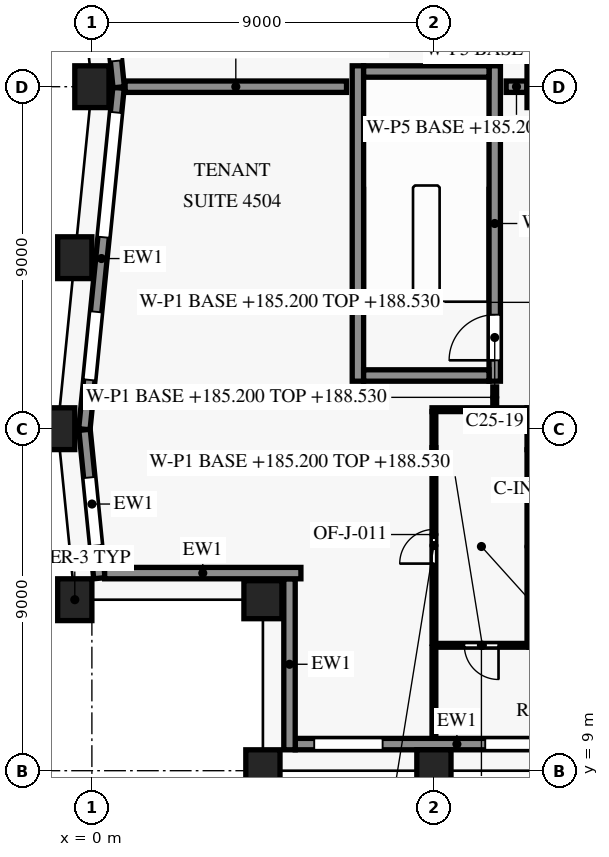
"""IFC4 building model, lengths in metres.
Left out: names, types, materials, properties, quantities, classifications, styles, units other than length and angle.
Written with IfcOpenShell. Run it as: python <this file> out.ifc"""

import sys

from ifc_helpers import new_model, si_unit, direction, frame, frame_2d, origin, origin_2d, place, context, subcontext, project, spatial, rectangle, extrude, element, fill, save


model = new_model("IFC4")
c1 = context("Model", 3, precision=1e-05, world=origin(), true_north=direction((0.0, 1.0)))
c2 = subcontext(c1, "Body", "Model", "MODEL_VIEW")
j1 = project(units=[si_unit("LENGTHUNIT", "METRE"), si_unit("PLANEANGLEUNIT", "RADIAN")], contexts=[c1])
p1 = place(None, origin())
s1 = spatial("IfcSite", under=j1, at=p1, CompositionType="ELEMENT")
p2 = place(p1, origin())
s2 = spatial("IfcBuilding", under=s1, at=p2, CompositionType="ELEMENT")
p3 = place(p2, frame((0.0, 0.0, 185.2)))
s3 = spatial("IfcBuildingStorey", under=s2, at=p3, CompositionType="ELEMENT", Elevation=185.2)
for number, where, z_axis, x_axis in (
    (1, (4.5, 9.0, 0.0), (0.0, 0.0, 1.0), (1.0, 0.0, 0.0)),
    (2, (9.0, 9.0, 0.0), (0.0, 0.0, 1.0), (1.0, 0.0, 0.0)),
    (3, (0.0, 27.0, 0.0), (0.0, 0.0, 1.0), (0.0, -1.0, 0.0)),
    (4, (-0.45, 22.5, 0.0), (0.0, 0.0, 1.0), (-0.1, -0.995, 0.0)),
    (5, (-0.9, 18.0, 0.0), (0.0, 0.0, 1.0), (0.0, -1.0, 0.0)),
    (6, (-0.45, 13.5, 0.0), (0.0, 0.0, 1.0), (0.1, -0.995, 0.0)),
):
    element("IfcColumn", number, at=place(p3, frame(where, z_axis=z_axis, x_axis=x_axis)), inside=s3, PredefinedType="COLUMN", context=c2, shape_type="SweptSolid", body=[
        extrude(rectangle(XDim=0.9, YDim=1.1, at=origin_2d()), origin(), (0.0, 0.0, 1.0), 3.8),
    ])
p4 = place(p3, frame((4.5, 13.5, 0.0), z_axis=(0.0, 0.0, 1.0), x_axis=(1.0, 0.0, 0.0)))
e7 = element("IfcColumn", 7, at=p4, inside=s3, PredefinedType="COLUMN", context=c2, shape_type="SweptSolid", body=[
    extrude(rectangle(XDim=1.0, YDim=1.0, at=origin_2d()), origin(), (0.0, 0.0, 1.0), 3.8),
])
for number, where, z_axis, x_axis in (
    (8, (12.0, 18.0, 0.0), (0.0, 0.0, 1.0), (1.0, 0.0, 0.0)),
    (9, (12.0, 27.0, 0.0), (0.0, 0.0, 1.0), (1.0, 0.0, 0.0)),
):
    element("IfcColumn", number, at=place(p3, frame(where, z_axis=z_axis, x_axis=x_axis)), inside=s3, PredefinedType="COLUMN", context=c2, shape_type="SweptSolid", body=[
        extrude(rectangle(XDim=1.1, YDim=1.1, at=origin_2d()), origin(), (0.0, 0.0, 1.0), 3.8),
    ])
p5 = place(p3, frame((13.86, 9.7, 0.0), z_axis=(0.0, 0.0, 1.0), x_axis=(-1.0, 0.0, 0.0)))
e10 = element("IfcWall", 10, at=p5, inside=s3, PredefinedType="SOLIDWALL", context=c2, shape_type="SweptSolid", body=[
    extrude(rectangle(XDim=8.51, YDim=0.3, at=frame_2d((4.255, 0.0))), origin(), (0.0, 0.0, 1.0), 3.15),
])
p6 = place(p5, frame((1.71, 0.0, 0.75)))
e11 = element("IfcOpeningElement", 11, at=p6, cuts=e10, PredefinedType="OPENING", context=c2, shape_type="SweptSolid", body=[
    extrude(rectangle(XDim=1.8, YDim=1.8, at=frame_2d((0.9, 0.9))), frame((0.0, 0.16, 0.0), z_axis=(0.0, -1.0, 0.0), x_axis=(1.0, 0.0, 0.0)), (0.0, 0.0, 1.0), 0.32),
])
p7 = place(p5, frame((6.21, 0.0, 0.75)))
e12 = element("IfcOpeningElement", 12, at=p7, cuts=e10, PredefinedType="OPENING", context=c2, shape_type="SweptSolid", body=[
    extrude(rectangle(XDim=1.8, YDim=1.8, at=frame_2d((0.9, 0.9))), frame((0.0, 0.16, 0.0), z_axis=(0.0, -1.0, 0.0), x_axis=(1.0, 0.0, 0.0)), (0.0, 0.0, 1.0), 0.32),
])
p8 = place(p3, frame((0.705, 26.985, 0.0), z_axis=(0.0, 0.0, 1.0), x_axis=(-0.099533329093, 0.995034228758, 0.0)))
e13 = element("IfcWall", 13, at=p8, inside=s3, PredefinedType="SOLIDWALL", context=c2, shape_type="SweptSolid", body=[
    extrude(rectangle(XDim=8.98, YDim=0.3, at=frame_2d((4.49, 0.0))), origin(), (0.0, 0.0, 1.0), 3.15),
])
p9 = place(p8, frame((0.696, 0.0, 0.15)))
e14 = element("IfcOpeningElement", 14, at=p9, cuts=e13, PredefinedType="OPENING", context=c2, shape_type="SweptSolid", body=[
    extrude(rectangle(XDim=3.3, YDim=2.4, at=frame_2d((1.65, 1.2))), frame((0.0, 0.16, 0.0), z_axis=(0.0, -1.0, 0.0), x_axis=(1.0, 0.0, 0.0)), (0.0, 0.0, 1.0), 0.32),
])
p10 = place(p8, frame((5.969, 0.0, 0.75)))
e15 = element("IfcOpeningElement", 15, at=p10, cuts=e13, PredefinedType="OPENING", context=c2, shape_type="SweptSolid", body=[
    extrude(rectangle(XDim=1.8, YDim=1.8, at=frame_2d((0.9, 0.9))), frame((0.0, 0.16, 0.0), z_axis=(0.0, -1.0, 0.0), x_axis=(1.0, 0.0, 0.0)), (0.0, 0.0, 1.0), 0.32),
])
p11 = place(p3, frame((-0.198, 17.985, 0.0), z_axis=(0.0, 0.0, 1.0), x_axis=(0.099495688264, 0.995037993253, 0.0)))
e16 = element("IfcWall", 16, at=p11, inside=s3, PredefinedType="SOLIDWALL", context=c2, shape_type="SweptSolid", body=[
    extrude(rectangle(XDim=9.03, YDim=0.3, at=frame_2d((4.515, 0.0))), origin(), (0.0, 0.0, 1.0), 3.15),
])
p12 = place(p11, frame((1.306, 0.0, 0.75)))
e17 = element("IfcOpeningElement", 17, at=p12, cuts=e16, PredefinedType="OPENING", context=c2, shape_type="SweptSolid", body=[
    extrude(rectangle(XDim=1.8, YDim=1.8, at=frame_2d((0.9, 0.9))), frame((0.0, 0.16, 0.0), z_axis=(0.0, -1.0, 0.0), x_axis=(1.0, 0.0, 0.0)), (0.0, 0.0, 1.0), 0.32),
])
p13 = place(p11, frame((5.079, 0.0, 0.15)))
e18 = element("IfcOpeningElement", 18, at=p13, cuts=e16, PredefinedType="OPENING", context=c2, shape_type="SweptSolid", body=[
    extrude(rectangle(XDim=3.3, YDim=2.4, at=frame_2d((1.65, 1.2))), frame((0.0, 0.16, 0.0), z_axis=(0.0, -1.0, 0.0), x_axis=(1.0, 0.0, 0.0)), (0.0, 0.0, 1.0), 0.32),
])
p14 = place(p3, frame((0.197, 14.065, 0.0), z_axis=(0.0, 0.0, 1.0), x_axis=(-0.099528354722, 0.995034726332, 0.0)))
e19 = element("IfcWall", 19, at=p14, inside=s3, PredefinedType="SOLIDWALL", context=c2, shape_type="SweptSolid", body=[
    extrude(rectangle(XDim=3.925, YDim=0.3, at=frame_2d((1.962, 0.0))), origin(), (0.0, 0.0, 1.0), 3.15),
])
p15 = place(p14, frame((0.864, 0.0, 0.75)))
e20 = element("IfcOpeningElement", 20, at=p15, cuts=e19, PredefinedType="OPENING", context=c2, shape_type="SweptSolid", body=[
    extrude(rectangle(XDim=1.8, YDim=1.8, at=frame_2d((0.9, 0.9))), frame((0.0, 0.16, 0.0), z_axis=(0.0, -1.0, 0.0), x_axis=(1.0, 0.0, 0.0)), (0.0, 0.0, 1.0), 0.32),
])
p16 = place(p3, frame((5.5, 14.2, 0.0), z_axis=(0.0, 0.0, 1.0), x_axis=(-1.0, 0.0, 0.0)))
e21 = element("IfcWall", 21, at=p16, inside=s3, PredefinedType="SOLIDWALL", context=c2, shape_type="SweptSolid", body=[
    extrude(rectangle(XDim=5.165, YDim=0.3, at=frame_2d((2.582, 0.0))), origin(), (0.0, 0.0, 1.0), 3.15),
])
p17 = place(p3, frame((5.2, 9.55, 0.0), z_axis=(0.0, 0.0, 1.0), x_axis=(0.0, 1.0, 0.0)))
e22 = element("IfcWall", 22, at=p17, inside=s3, PredefinedType="SOLIDWALL", context=c2, shape_type="SweptSolid", body=[
    extrude(rectangle(XDim=4.502, YDim=0.3, at=frame_2d((2.251, 0.0))), origin(), (0.0, 0.0, 1.0), 3.15),
])
for number, where, z_axis, x_axis in (
    (23, (7.15, 19.4, 0.0), (0.0, 0.0, 1.0), (1.0, 0.0, 0.0)),
    (24, (7.15, 27.4, 0.0), (0.0, 0.0, 1.0), (1.0, 0.0, 0.0)),
):
    element("IfcWall", number, at=place(p3, frame(where, z_axis=z_axis, x_axis=x_axis)), inside=s3, PredefinedType="SHEAR", context=c2, shape_type="SweptSolid", body=[
        extrude(rectangle(XDim=3.3, YDim=0.3, at=frame_2d((1.65, 0.0))), origin(), (0.0, 0.0, 1.0), 3.5),
    ])
p18 = place(p3, frame((7.0, 19.25, 0.0), z_axis=(0.0, 0.0, 1.0), x_axis=(0.0, 1.0, 0.0)))
e25 = element("IfcWall", 25, at=p18, inside=s3, PredefinedType="SHEAR", context=c2, shape_type="SweptSolid", body=[
    extrude(rectangle(XDim=8.3, YDim=0.3, at=frame_2d((4.15, 0.0))), origin(), (0.0, 0.0, 1.0), 3.5),
])
p19 = place(p3, frame((10.6, 19.25, 0.0), z_axis=(0.0, 0.0, 1.0), x_axis=(0.0, 1.0, 0.0)))
e26 = element("IfcWall", 26, at=p19, inside=s3, PredefinedType="SHEAR", context=c2, shape_type="SweptSolid", body=[
    extrude(rectangle(XDim=8.3, YDim=0.3, at=frame_2d((4.15, 0.0))), origin(), (0.0, 0.0, 1.0), 3.5),
])
p20 = place(p19, frame((0.55, 0.0, 0.0)))
e27 = element("IfcOpeningElement", 27, at=p20, cuts=e26, PredefinedType="OPENING", context=c2, shape_type="SweptSolid", body=[
    extrude(rectangle(XDim=1.2, YDim=2.2, at=frame_2d((0.6, 1.1))), frame((0.0, 0.16, 0.0), z_axis=(0.0, -1.0, 0.0), x_axis=(1.0, 0.0, 0.0)), (0.0, 0.0, 1.0), 0.32),
])
p21 = place(p3, frame((9.0, 9.87, 0.0), z_axis=(0.0, 0.0, 1.0), x_axis=(0.0, 1.0, 0.0)))
e28 = element("IfcWall", 28, at=p21, inside=s3, PredefinedType="PARTITIONING", context=c2, shape_type="SweptSolid", body=[
    extrude(rectangle(XDim=2.38, YDim=0.1, at=frame_2d((1.19, 0.0))), origin(), (0.0, 0.0, 1.0), 3.33),
])
p22 = place(p3, frame((11.5, 12.3, 0.0), z_axis=(0.0, 0.0, 1.0), x_axis=(-1.0, 0.0, 0.0)))
e29 = element("IfcWall", 29, at=p22, inside=s3, PredefinedType="PARTITIONING", context=c2, shape_type="SweptSolid", body=[
    extrude(rectangle(XDim=2.45, YDim=0.1, at=frame_2d((1.225, 0.0))), origin(), (0.0, 0.0, 1.0), 3.33),
])
p23 = place(p22, frame((0.8, 0.0, 0.0)))
e30 = element("IfcOpeningElement", 30, at=p23, cuts=e29, PredefinedType="OPENING", context=c2, shape_type="SweptSolid", body=[
    extrude(rectangle(XDim=0.9, YDim=2.1, at=frame_2d((0.45, 1.05))), frame((0.0, 0.06, 0.0), z_axis=(0.0, -1.0, 0.0), x_axis=(1.0, 0.0, 0.0)), (0.0, 0.0, 1.0), 0.12),
])
p24 = place(p3, frame((11.5, 12.3, 0.0), z_axis=(0.0, 0.0, 1.0), x_axis=(1.0, 0.0, 0.0)))
e31 = element("IfcWall", 31, at=p24, inside=s3, PredefinedType="PARTITIONING", context=c2, shape_type="SweptSolid", body=[
    extrude(rectangle(XDim=2.05, YDim=0.1, at=frame_2d((1.025, 0.0))), origin(), (0.0, 0.0, 1.0), 2.63),
])
p25 = place(p3, frame((9.0, 12.35, 0.0), z_axis=(0.0, 0.0, 1.0), x_axis=(0.0, 1.0, 0.0)))
e32 = element("IfcWall", 32, at=p25, inside=s3, PredefinedType="PARTITIONING", context=c2, shape_type="SweptSolid", body=[
    extrude(rectangle(XDim=5.15, YDim=0.1, at=frame_2d((2.575, 0.0))), origin(), (0.0, 0.0, 1.0), 3.33),
])
p26 = place(p25, frame((2.1, 0.0, 0.0)))
e33 = element("IfcOpeningElement", 33, at=p26, cuts=e32, PredefinedType="OPENING", context=c2, shape_type="SweptSolid", body=[
    extrude(rectangle(XDim=0.9, YDim=2.1, at=frame_2d((0.45, 1.05))), frame((0.0, 0.06, 0.0), z_axis=(0.0, -1.0, 0.0), x_axis=(1.0, 0.0, 0.0)), (0.0, 0.0, 1.0), 0.12),
])
p27 = place(p3, frame((11.5, 17.445, 0.0), z_axis=(0.0, 0.0, 1.0), x_axis=(0.0, -1.0, 0.0)))
e34 = element("IfcWall", 34, at=p27, inside=s3, PredefinedType="PARTITIONING", context=c2, shape_type="SweptSolid", body=[
    extrude(rectangle(XDim=5.095, YDim=0.1, at=frame_2d((2.547, 0.0))), origin(), (0.0, 0.0, 1.0), 3.33),
])
p28 = place(p3, frame((9.0, 17.5, 0.0), z_axis=(0.0, 0.0, 1.0), x_axis=(0.0, 1.0, 0.0)))
e35 = element("IfcWall", 35, at=p28, inside=s3, PredefinedType="PARTITIONING", context=c2, shape_type="SweptSolid", body=[
    extrude(rectangle(XDim=0.95, YDim=0.1, at=frame_2d((0.475, 0.0))), origin(), (0.0, 0.0, 1.0), 2.78),
])
p29 = place(p3, frame((8.95, 18.5, 0.0), z_axis=(0.0, 0.0, 1.0), x_axis=(1.0, 0.0, 0.0)))
e36 = element("IfcWall", 36, at=p29, inside=s3, PredefinedType="PARTITIONING", context=c2, shape_type="SweptSolid", body=[
    extrude(rectangle(XDim=2.48, YDim=0.1, at=frame_2d((1.24, 0.0))), origin(), (0.0, 0.0, 1.0), 3.33),
])
p30 = place(p3, frame((10.6, 18.55, 0.0), z_axis=(0.0, 0.0, 1.0), x_axis=(0.0, 1.0, 0.0)))
e37 = element("IfcWall", 37, at=p30, inside=s3, PredefinedType="PARTITIONING", context=c2, shape_type="SweptSolid", body=[
    extrude(rectangle(XDim=0.55, YDim=0.1, at=frame_2d((0.275, 0.0))), origin(), (0.0, 0.0, 1.0), 3.33),
])
p31 = place(p3, frame((0.874, 27.0, 0.0), z_axis=(0.0, 0.0, 1.0), x_axis=(1.0, 0.0, 0.0)))
e38 = element("IfcWall", 38, at=p31, inside=s3, PredefinedType="PARTITIONING", context=c2, shape_type="SweptSolid", body=[
    extrude(rectangle(XDim=5.826, YDim=0.3, at=frame_2d((2.913, 0.0))), origin(), (0.0, 0.0, 1.0), 2.63),
])
p32 = place(p3, frame((10.9, 27.0, 0.0), z_axis=(0.0, 0.0, 1.0), x_axis=(1.0, 0.0, 0.0)))
e39 = element("IfcWall", 39, at=p32, inside=s3, PredefinedType="PARTITIONING", context=c2, shape_type="SweptSolid", body=[
    extrude(rectangle(XDim=0.545, YDim=0.3, at=frame_2d((0.272, 0.0))), origin(), (0.0, 0.0, 1.0), 3.33),
])
p33 = place(p3, frame((10.748, 33.45, 0.0), z_axis=(0.0, 0.0, 1.0), x_axis=(0.0, -1.0, 0.0)))
e40 = element("IfcWall", 40, at=p33, inside=s3, PredefinedType="PARTITIONING", context=c2, shape_type="SweptSolid", body=[
    extrude(rectangle(XDim=5.75, YDim=0.1, at=frame_2d((2.875, 0.0))), origin(), (0.0, 0.0, 1.0), 3.33),
])
p34 = place(p6, origin())
e41 = element("IfcWindow", 41, at=p34, inside=s3, PartitioningType="SINGLE_PANEL", PredefinedType="WINDOW", context=c2, shape_type="SweptSolid", body=[
    extrude(rectangle(XDim=1.8, YDim=1.8, at=frame_2d((0.9, 0.9))), frame((0.0, 0.03, 0.0), z_axis=(0.0, -1.0, 0.0), x_axis=(1.0, 0.0, 0.0)), (0.0, 0.0, 1.0), 0.06),
])
fill(e11, e41)
p35 = place(p7, origin())
e42 = element("IfcWindow", 42, at=p35, inside=s3, PartitioningType="SINGLE_PANEL", PredefinedType="WINDOW", context=c2, shape_type="SweptSolid", body=[
    extrude(rectangle(XDim=1.8, YDim=1.8, at=frame_2d((0.9, 0.9))), frame((0.0, 0.03, 0.0), z_axis=(0.0, -1.0, 0.0), x_axis=(1.0, 0.0, 0.0)), (0.0, 0.0, 1.0), 0.06),
])
fill(e12, e42)
p36 = place(p9, origin())
e43 = element("IfcWindow", 43, at=p36, inside=s3, PartitioningType="SINGLE_PANEL", PredefinedType="WINDOW", context=c2, shape_type="SweptSolid", body=[
    extrude(rectangle(XDim=3.3, YDim=2.4, at=frame_2d((1.65, 1.2))), frame((0.0, 0.03, 0.0), z_axis=(0.0, -1.0, 0.0), x_axis=(1.0, 0.0, 0.0)), (0.0, 0.0, 1.0), 0.06),
])
fill(e14, e43)
p37 = place(p12, origin())
e44 = element("IfcWindow", 44, at=p37, inside=s3, PartitioningType="SINGLE_PANEL", PredefinedType="WINDOW", context=c2, shape_type="SweptSolid", body=[
    extrude(rectangle(XDim=1.8, YDim=1.8, at=frame_2d((0.9, 0.9))), frame((0.0, 0.03, 0.0), z_axis=(0.0, -1.0, 0.0), x_axis=(1.0, 0.0, 0.0)), (0.0, 0.0, 1.0), 0.06),
])
fill(e17, e44)
p38 = place(p13, origin())
e45 = element("IfcWindow", 45, at=p38, inside=s3, PartitioningType="SINGLE_PANEL", PredefinedType="WINDOW", context=c2, shape_type="SweptSolid", body=[
    extrude(rectangle(XDim=3.3, YDim=2.4, at=frame_2d((1.65, 1.2))), frame((0.0, 0.03, 0.0), z_axis=(0.0, -1.0, 0.0), x_axis=(1.0, 0.0, 0.0)), (0.0, 0.0, 1.0), 0.06),
])
fill(e18, e45)
p39 = place(p15, origin())
e46 = element("IfcWindow", 46, at=p39, inside=s3, PartitioningType="SINGLE_PANEL", PredefinedType="WINDOW", context=c2, shape_type="SweptSolid", body=[
    extrude(rectangle(XDim=1.8, YDim=1.8, at=frame_2d((0.9, 0.9))), frame((0.0, 0.03, 0.0), z_axis=(0.0, -1.0, 0.0), x_axis=(1.0, 0.0, 0.0)), (0.0, 0.0, 1.0), 0.06),
])
fill(e20, e46)
p40 = place(p20, origin())
e47 = element("IfcDoor", 47, at=p40, inside=s3, OperationType="SINGLE_SWING_RIGHT", PredefinedType="DOOR", context=c2, shape_type="SweptSolid", body=[
    extrude(rectangle(XDim=1.2, YDim=2.2, at=frame_2d((0.6, 1.1))), frame((0.0, 0.025, 0.0), z_axis=(0.0, -1.0, 0.0), x_axis=(1.0, 0.0, 0.0)), (0.0, 0.0, 1.0), 0.05),
])
fill(e27, e47)
p41 = place(p23, origin())
e48 = element("IfcDoor", 48, at=p41, inside=s3, OperationType="SINGLE_SWING_RIGHT", PredefinedType="DOOR", context=c2, shape_type="SweptSolid", body=[
    extrude(rectangle(XDim=0.9, YDim=2.1, at=frame_2d((0.45, 1.05))), frame((0.0, 0.025, 0.0), z_axis=(0.0, -1.0, 0.0), x_axis=(1.0, 0.0, 0.0)), (0.0, 0.0, 1.0), 0.05),
])
fill(e30, e48)
p42 = place(p26, origin())
e49 = element("IfcDoor", 49, at=p42, inside=s3, OperationType="SINGLE_SWING_RIGHT", PredefinedType="DOOR", context=c2, shape_type="SweptSolid", body=[
    extrude(rectangle(XDim=0.9, YDim=2.1, at=frame_2d((0.45, 1.05))), frame((0.0, 0.025, 0.0), z_axis=(0.0, -1.0, 0.0), x_axis=(1.0, 0.0, 0.0)), (0.0, 0.0, 1.0), 0.05),
])
fill(e33, e49)
save(model, sys.argv[1])
